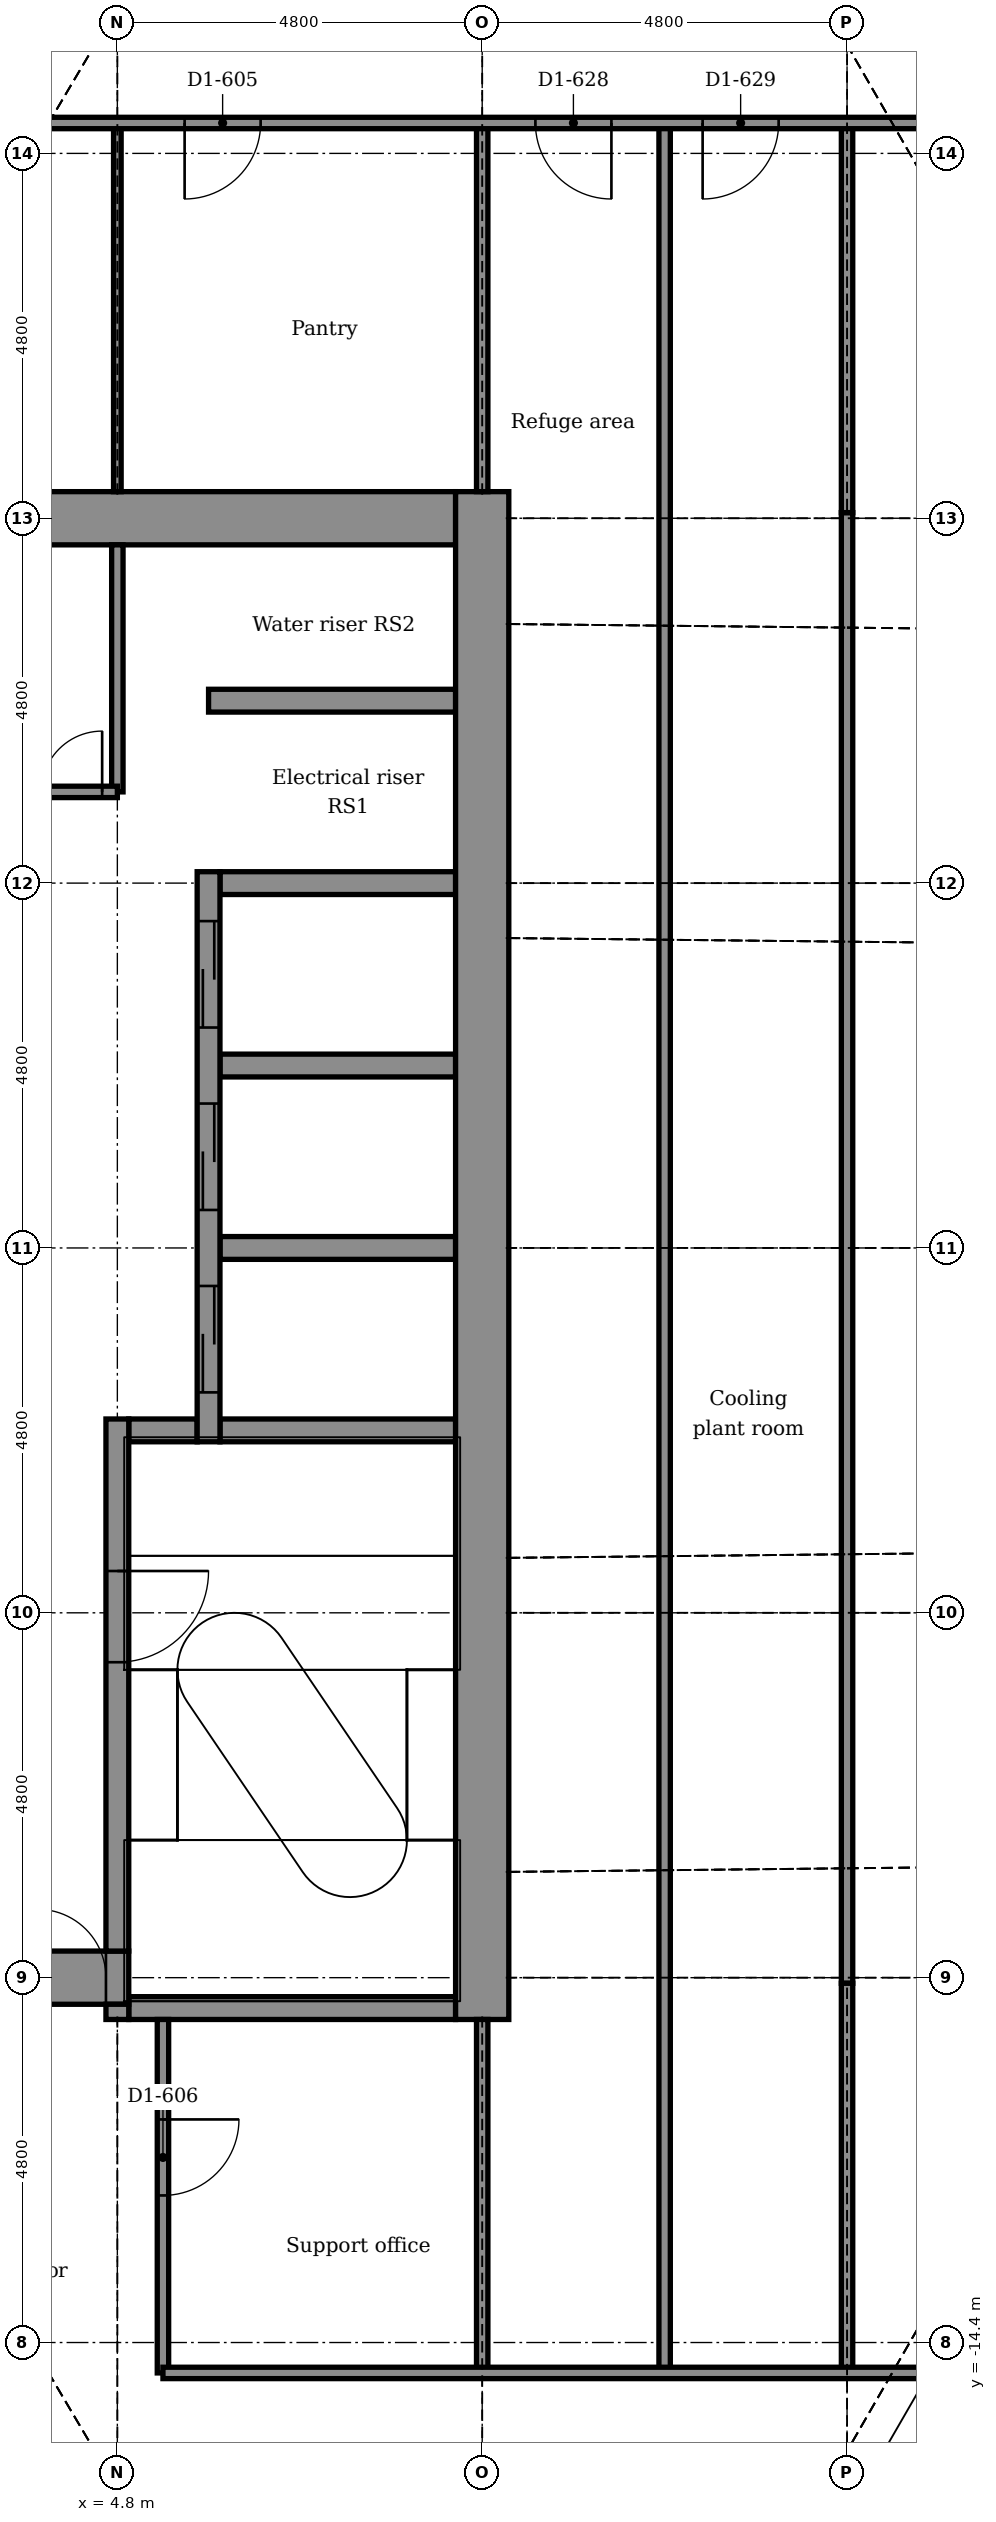
"""IFC4 building model, lengths in metres.
Left out: names, types, materials, properties, quantities, classifications, styles, units other than length and angle.
Written with IfcOpenShell. Run it as: python <this file> out.ifc"""

import sys

from ifc_helpers import new_model, si_unit, direction, frame, frame_2d, origin, place, context, subcontext, project, spatial, rectangle, extrude, element, fill, save


model = new_model("IFC4")
c1 = context("Model", 3, precision=1e-05, world=origin(), true_north=direction((0.0, 1.0)))
c2 = subcontext(c1, "Body", "Model", "MODEL_VIEW")
j1 = project(units=[si_unit("LENGTHUNIT", "METRE"), si_unit("PLANEANGLEUNIT", "RADIAN")], contexts=[c1])
p1 = place(None, origin())
s1 = spatial("IfcSite", under=j1, at=p1, CompositionType="ELEMENT")
p2 = place(p1, origin())
s2 = spatial("IfcBuilding", under=s1, at=p2, CompositionType="ELEMENT")
p3 = place(p2, frame((0.0, 0.0, 216.8)))
s3 = spatial("IfcBuildingStorey", under=s2, at=p3, CompositionType="ELEMENT", Elevation=216.8)
p4 = place(p3, frame((4.95, -10.0, -0.3), z_axis=(0.0, 0.0, 1.0), x_axis=(1.0, 0.0, 0.0)))
e1 = element("IfcWall", 1, at=p4, inside=s3, PredefinedType="STANDARD", context=c2, shape_type="SweptSolid", body=[
    extrude(rectangle(XDim=4.3, YDim=0.3, at=frame_2d((2.15, 0.0))), origin(), (0.0, 0.0, 1.0), 6.15),
])
p5 = place(p3, frame((-5.25, -9.6, -0.3), z_axis=(0.0, 0.0, 1.0), x_axis=(1.0, 0.0, 0.0)))
e2 = element("IfcWall", 2, at=p5, inside=s3, PredefinedType="SHEAR", context=c2, shape_type="SweptSolid", body=[
    extrude(rectangle(XDim=10.2, YDim=0.7, at=frame_2d((5.1, 0.0))), origin(), (0.0, 0.0, 1.0), 6.15),
])
p6 = place(p5, frame((9.0, 0.0, 0.3)))
e3 = element("IfcOpeningElement", 3, at=p6, cuts=e2, PredefinedType="OPENING", context=c2, shape_type="SweptSolid", body=[
    extrude(rectangle(XDim=0.9, YDim=2.1, at=frame_2d((0.45, 1.05))), frame((0.0, 0.36, 0.0), z_axis=(0.0, -1.0, 0.0), x_axis=(1.0, 0.0, 0.0)), (0.0, 0.0, 1.0), 0.72),
])
p7 = place(p3, frame((4.95, -2.4, -0.3), z_axis=(0.0, 0.0, 1.0), x_axis=(1.0, 0.0, 0.0)))
e4 = element("IfcWall", 4, at=p7, inside=s3, PredefinedType="STANDARD", context=c2, shape_type="SweptSolid", body=[
    extrude(rectangle(XDim=0.9, YDim=0.3, at=frame_2d((0.45, 0.0))), origin(), (0.0, 0.0, 1.0), 6.15),
])
for number, where, z_axis, x_axis in (
    (5, (6.15, -2.4, -0.3), (0.0, 0.0, 1.0), (1.0, 0.0, 0.0)),
    (6, (6.15, 0.0, -0.3), (0.0, 0.0, 1.0), (1.0, 0.0, 0.0)),
    (7, (6.15, 2.4, -0.3), (0.0, 0.0, 1.0), (1.0, 0.0, 0.0)),
    (8, (6.15, 4.8, -0.3), (0.0, 0.0, 1.0), (1.0, 0.0, 0.0)),
):
    element("IfcWall", number, at=place(p3, frame(where, z_axis=z_axis, x_axis=x_axis)), inside=s3, PredefinedType="STANDARD", context=c2, shape_type="SweptSolid", body=[
        extrude(rectangle(XDim=3.1, YDim=0.3, at=frame_2d((1.55, 0.0))), origin(), (0.0, 0.0, 1.0), 6.15),
    ])
p8 = place(p3, frame((6.0, 7.2, -0.3), z_axis=(0.0, 0.0, 1.0), x_axis=(1.0, 0.0, 0.0)))
e9 = element("IfcWall", 9, at=p8, inside=s3, PredefinedType="STANDARD", context=c2, shape_type="SweptSolid", body=[
    extrude(rectangle(XDim=3.25, YDim=0.3, at=frame_2d((1.625, 0.0))), origin(), (0.0, 0.0, 1.0), 6.15),
])
p9 = place(p3, frame((-5.25, 9.6, -0.3), z_axis=(0.0, 0.0, 1.0), x_axis=(1.0, 0.0, 0.0)))
e10 = element("IfcWall", 10, at=p9, inside=s3, PredefinedType="SHEAR", context=c2, shape_type="SweptSolid", body=[
    extrude(rectangle(XDim=14.5, YDim=0.7, at=frame_2d((7.25, 0.0))), origin(), (0.0, 0.0, 1.0), 6.15),
])
p10 = place(p9, frame((0.6, 0.0, 0.3)))
e11 = element("IfcOpeningElement", 11, at=p10, cuts=e10, PredefinedType="OPENING", context=c2, shape_type="SweptSolid", body=[
    extrude(rectangle(XDim=0.9, YDim=2.1, at=frame_2d((0.45, 1.05))), frame((0.0, 0.36, 0.0), z_axis=(0.0, -1.0, 0.0), x_axis=(1.0, 0.0, 0.0)), (0.0, 0.0, 1.0), 0.72),
])
p11 = place(p3, frame((4.8, -10.15, -0.3), z_axis=(0.0, 0.0, 1.0), x_axis=(0.0, 1.0, 0.0)))
e12 = element("IfcWall", 12, at=p11, inside=s3, PredefinedType="STANDARD", context=c2, shape_type="SweptSolid", body=[
    extrude(rectangle(XDim=0.2, YDim=0.3, at=frame_2d((0.1, 0.0))), origin(), (0.0, 0.0, 1.0), 6.15),
])
p12 = place(p3, frame((4.8, -9.25, -0.3), z_axis=(0.0, 0.0, 1.0), x_axis=(0.0, 1.0, 0.0)))
e13 = element("IfcWall", 13, at=p12, inside=s3, PredefinedType="STANDARD", context=c2, shape_type="SweptSolid", body=[
    extrude(rectangle(XDim=7.0, YDim=0.3, at=frame_2d((3.5, 0.0))), origin(), (0.0, 0.0, 1.0), 6.15),
])
p13 = place(p12, frame((3.8, 0.0, 0.3)))
e14 = element("IfcOpeningElement", 14, at=p13, cuts=e13, PredefinedType="OPENING", context=c2, shape_type="SweptSolid", body=[
    extrude(rectangle(XDim=1.2, YDim=2.1, at=frame_2d((0.6, 1.05))), frame((0.0, 0.16, 0.0), z_axis=(0.0, -1.0, 0.0), x_axis=(1.0, 0.0, 0.0)), (0.0, 0.0, 1.0), 0.32),
])
p14 = place(p3, frame((6.0, -2.55, -0.3), z_axis=(0.0, 0.0, 1.0), x_axis=(0.0, 1.0, 0.0)))
e15 = element("IfcWall", 15, at=p14, inside=s3, PredefinedType="STANDARD", context=c2, shape_type="SweptSolid", body=[
    extrude(rectangle(XDim=7.5, YDim=0.3, at=frame_2d((3.75, 0.0))), origin(), (0.0, 0.0, 1.0), 6.15),
])
p15 = place(p14, frame((0.65, 0.0, 0.3)))
e16 = element("IfcOpeningElement", 16, at=p15, cuts=e15, PredefinedType="OPENING", context=c2, shape_type="SweptSolid", body=[
    extrude(rectangle(XDim=1.4, YDim=2.1, at=frame_2d((0.7, 1.05))), frame((0.0, 0.16, 0.0), z_axis=(0.0, -1.0, 0.0), x_axis=(1.0, 0.0, 0.0)), (0.0, 0.0, 1.0), 0.32),
])
p16 = place(p14, frame((3.05, 0.0, 0.3)))
e17 = element("IfcOpeningElement", 17, at=p16, cuts=e15, PredefinedType="OPENING", context=c2, shape_type="SweptSolid", body=[
    extrude(rectangle(XDim=1.4, YDim=2.1, at=frame_2d((0.7, 1.05))), frame((0.0, 0.16, 0.0), z_axis=(0.0, -1.0, 0.0), x_axis=(1.0, 0.0, 0.0)), (0.0, 0.0, 1.0), 0.32),
])
p17 = place(p14, frame((5.45, 0.0, 0.3)))
e18 = element("IfcOpeningElement", 18, at=p17, cuts=e15, PredefinedType="OPENING", context=c2, shape_type="SweptSolid", body=[
    extrude(rectangle(XDim=1.4, YDim=2.1, at=frame_2d((0.7, 1.05))), frame((0.0, 0.16, 0.0), z_axis=(0.0, -1.0, 0.0), x_axis=(1.0, 0.0, 0.0)), (0.0, 0.0, 1.0), 0.32),
])
p18 = place(p3, frame((9.6, -10.15, -0.3), z_axis=(0.0, 0.0, 1.0), x_axis=(0.0, 1.0, 0.0)))
e19 = element("IfcWall", 19, at=p18, inside=s3, PredefinedType="SHEAR", context=c2, shape_type="SweptSolid", body=[
    extrude(rectangle(XDim=20.1, YDim=0.7, at=frame_2d((10.05, 0.0))), origin(), (0.0, 0.0, 1.0), 6.15),
])
p19 = place(p3, frame((14.4, -9.674, 0.0), z_axis=(0.0, 0.0, 1.0), x_axis=(0.0, 1.0, 0.0)))
e20 = element("IfcWall", 20, at=p19, inside=s3, PredefinedType="PARTITIONING", context=c2, shape_type="SweptSolid", body=[
    extrude(rectangle(XDim=19.348, YDim=0.15, at=frame_2d((9.674, 0.0))), origin(), (0.0, 0.0, 1.0), 5.85),
])
for number, where, z_axis, x_axis in (
    (21, (14.4, -14.8, 0.0), (0.0, 0.0, 1.0), (0.0, 1.0, 0.0)),
    (22, (14.4, 9.674, 0.0), (0.0, 0.0, 1.0), (0.0, 1.0, 0.0)),
):
    element("IfcWall", number, at=place(p3, frame(where, z_axis=z_axis, x_axis=x_axis)), inside=s3, PredefinedType="PARTITIONING", context=c2, shape_type="SweptSolid", body=[
        extrude(rectangle(XDim=5.126, YDim=0.15, at=frame_2d((2.563, 0.0))), origin(), (0.0, 0.0, 1.0), 5.54),
    ])
p20 = place(p3, frame((12.0, -14.8, 0.0), z_axis=(0.0, 0.0, 1.0), x_axis=(0.0, 1.0, 0.0)))
e23 = element("IfcWall", 23, at=p20, inside=s3, PredefinedType="PARTITIONING", context=c2, shape_type="SweptSolid", body=[
    extrude(rectangle(XDim=29.6, YDim=0.15, at=frame_2d((14.8, 0.0))), origin(), (0.0, 0.0, 1.0), 5.85),
])
p21 = place(p3, frame((9.6, -14.8, 0.0), z_axis=(0.0, 0.0, 1.0), x_axis=(0.0, 1.0, 0.0)))
e24 = element("IfcWall", 24, at=p21, inside=s3, PredefinedType="PARTITIONING", context=c2, shape_type="SweptSolid", body=[
    extrude(rectangle(XDim=4.65, YDim=0.15, at=frame_2d((2.325, 0.0))), origin(), (0.0, 0.0, 1.0), 5.393),
])
p22 = place(p3, frame((9.6, 9.95, 0.0), z_axis=(0.0, 0.0, 1.0), x_axis=(0.0, 1.0, 0.0)))
e25 = element("IfcWall", 25, at=p22, inside=s3, PredefinedType="PARTITIONING", context=c2, shape_type="SweptSolid", body=[
    extrude(rectangle(XDim=4.85, YDim=0.15, at=frame_2d((2.425, 0.0))), origin(), (0.0, 0.0, 1.0), 5.393),
])
p23 = place(p3, frame((5.4, -14.8, 0.0), z_axis=(0.0, 0.0, 1.0), x_axis=(0.0, 1.0, 0.0)))
e26 = element("IfcWall", 26, at=p23, inside=s3, PredefinedType="PARTITIONING", context=c2, shape_type="SweptSolid", body=[
    extrude(rectangle(XDim=4.65, YDim=0.15, at=frame_2d((2.325, 0.0))), origin(), (0.0, 0.0, 1.0), 5.85),
])
p24 = place(p23, frame((2.335, 0.0, 0.0)))
e27 = element("IfcOpeningElement", 27, at=p24, cuts=e26, PredefinedType="OPENING", context=c2, shape_type="SweptSolid", body=[
    extrude(rectangle(XDim=1.0, YDim=2.1, at=frame_2d((0.5, 1.05))), frame((0.0, 0.085, 0.0), z_axis=(0.0, -1.0, 0.0), x_axis=(1.0, 0.0, 0.0)), (0.0, 0.0, 1.0), 0.17),
])
p25 = place(p3, frame((4.8, 9.95, 0.0), z_axis=(0.0, 0.0, 1.0), x_axis=(0.0, 1.0, 0.0)))
e28 = element("IfcWall", 28, at=p25, inside=s3, PredefinedType="PARTITIONING", context=c2, shape_type="SweptSolid", body=[
    extrude(rectangle(XDim=4.85, YDim=0.1, at=frame_2d((2.425, 0.0))), origin(), (0.0, 0.0, 1.0), 5.54),
])
p26 = place(p3, frame((4.8, 6.0, 0.0), z_axis=(0.0, 0.0, 1.0), x_axis=(0.0, 1.0, 0.0)))
e29 = element("IfcWall", 29, at=p26, inside=s3, PredefinedType="PARTITIONING", context=c2, shape_type="SweptSolid", body=[
    extrude(rectangle(XDim=3.25, YDim=0.15, at=frame_2d((1.625, 0.0))), origin(), (0.0, 0.0, 1.0), 5.85),
])
p27 = place(p3, frame((5.4, -14.8, 0.0), z_axis=(0.0, 0.0, 1.0), x_axis=(1.0, 0.0, 0.0)))
e30 = element("IfcWall", 30, at=p27, inside=s3, PredefinedType="PARTITIONING", context=c2, shape_type="SweptSolid", body=[
    extrude(rectangle(XDim=11.834, YDim=0.15, at=frame_2d((5.917, 0.0))), origin(), (0.0, 0.0, 1.0), 5.7),
])
p28 = place(p27, frame((10.511, 0.0, 0.0)))
e31 = element("IfcOpeningElement", 31, at=p28, cuts=e30, PredefinedType="OPENING", context=c2, shape_type="SweptSolid", body=[
    extrude(rectangle(XDim=1.0, YDim=2.1, at=frame_2d((0.5, 1.05))), frame((0.0, 0.085, 0.0), z_axis=(0.0, -1.0, 0.0), x_axis=(1.0, 0.0, 0.0)), (0.0, 0.0, 1.0), 0.17),
])
p29 = place(p3, frame((3.75, 6.0, 0.0), z_axis=(0.0, 0.0, 1.0), x_axis=(1.0, 0.0, 0.0)))
e32 = element("IfcWall", 32, at=p29, inside=s3, PredefinedType="PARTITIONING", context=c2, shape_type="SweptSolid", body=[
    extrude(rectangle(XDim=1.05, YDim=0.15, at=frame_2d((0.525, 0.0))), origin(), (0.0, 0.0, 1.0), 5.85),
])
p30 = place(p29, frame((0.05, 0.0, 0.0)))
e33 = element("IfcOpeningElement", 33, at=p30, cuts=e32, PredefinedType="OPENING", context=c2, shape_type="SweptSolid", body=[
    extrude(rectangle(XDim=0.8, YDim=2.1, at=frame_2d((0.4, 1.05))), frame((0.0, 0.085, 0.0), z_axis=(0.0, -1.0, 0.0), x_axis=(1.0, 0.0, 0.0)), (0.0, 0.0, 1.0), 0.17),
])
p31 = place(p3, frame((-3.0, 14.8, 0.0), z_axis=(0.0, 0.0, 1.0), x_axis=(1.0, 0.0, 0.0)))
e34 = element("IfcWall", 34, at=p31, inside=s3, PredefinedType="PARTITIONING", context=c2, shape_type="SweptSolid", body=[
    extrude(rectangle(XDim=21.385, YDim=0.15, at=frame_2d((10.692, 0.0))), origin(), (0.0, 0.0, 1.0), 5.85),
])
p32 = place(p31, frame((1.05, 0.0, 0.0)))
e35 = element("IfcOpeningElement", 35, at=p32, cuts=e34, PredefinedType="OPENING", context=c2, shape_type="SweptSolid", body=[
    extrude(rectangle(XDim=0.9, YDim=2.1, at=frame_2d((0.45, 1.05))), frame((0.0, 0.085, 0.0), z_axis=(0.0, -1.0, 0.0), x_axis=(1.0, 0.0, 0.0)), (0.0, 0.0, 1.0), 0.17),
])
p33 = place(p31, frame((4.95, 0.0, 0.0)))
e36 = element("IfcOpeningElement", 36, at=p33, cuts=e34, PredefinedType="OPENING", context=c2, shape_type="SweptSolid", body=[
    extrude(rectangle(XDim=0.9, YDim=2.1, at=frame_2d((0.45, 1.05))), frame((0.0, 0.085, 0.0), z_axis=(0.0, -1.0, 0.0), x_axis=(1.0, 0.0, 0.0)), (0.0, 0.0, 1.0), 0.17),
])
p34 = place(p31, frame((8.685, 0.0, 0.0)))
e37 = element("IfcOpeningElement", 37, at=p34, cuts=e34, PredefinedType="OPENING", context=c2, shape_type="SweptSolid", body=[
    extrude(rectangle(XDim=1.0, YDim=2.1, at=frame_2d((0.5, 1.05))), frame((0.0, 0.085, 0.0), z_axis=(0.0, -1.0, 0.0), x_axis=(1.0, 0.0, 0.0)), (0.0, 0.0, 1.0), 0.17),
])
p35 = place(p31, frame((13.3, 0.0, 0.0)))
e38 = element("IfcOpeningElement", 38, at=p35, cuts=e34, PredefinedType="OPENING", context=c2, shape_type="SweptSolid", body=[
    extrude(rectangle(XDim=1.0, YDim=2.1, at=frame_2d((0.5, 1.05))), frame((0.0, 0.085, 0.0), z_axis=(0.0, -1.0, 0.0), x_axis=(1.0, 0.0, 0.0)), (0.0, 0.0, 1.0), 0.17),
])
p36 = place(p31, frame((15.5, 0.0, 0.0)))
e39 = element("IfcOpeningElement", 39, at=p36, cuts=e34, PredefinedType="OPENING", context=c2, shape_type="SweptSolid", body=[
    extrude(rectangle(XDim=1.0, YDim=2.1, at=frame_2d((0.5, 1.05))), frame((0.0, 0.085, 0.0), z_axis=(0.0, -1.0, 0.0), x_axis=(1.0, 0.0, 0.0)), (0.0, 0.0, 1.0), 0.17),
])
p37 = place(p30, origin())
e40 = element("IfcDoor", 40, at=p37, inside=s3, OperationType="SINGLE_SWING_RIGHT", PredefinedType="DOOR", context=c2, shape_type="SweptSolid", body=[
    extrude(rectangle(XDim=0.8, YDim=2.1, at=frame_2d((0.4, 1.05))), frame((0.0, 0.025, 0.0), z_axis=(0.0, -1.0, 0.0), x_axis=(1.0, 0.0, 0.0)), (0.0, 0.0, 1.0), 0.05),
])
fill(e33, e40)
p38 = place(p34, frame((1.0, 0.0, 0.0), z_axis=(0.0, 0.0, 1.0), x_axis=(-1.0, 0.0, 0.0)))
e41 = element("IfcDoor", 41, at=p38, inside=s3, OperationType="SINGLE_SWING_LEFT", PredefinedType="DOOR", context=c2, shape_type="SweptSolid", body=[
    extrude(rectangle(XDim=1.0, YDim=2.1, at=frame_2d((0.5, 1.05))), frame((0.0, 0.025, 0.0), z_axis=(0.0, -1.0, 0.0), x_axis=(1.0, 0.0, 0.0)), (0.0, 0.0, 1.0), 0.05),
])
fill(e37, e41)
p39 = place(p24, frame((1.0, 0.0, 0.0), z_axis=(0.0, 0.0, 1.0), x_axis=(-1.0, 0.0, 0.0)))
e42 = element("IfcDoor", 42, at=p39, inside=s3, OperationType="SINGLE_SWING_RIGHT", PredefinedType="DOOR", context=c2, shape_type="SweptSolid", body=[
    extrude(rectangle(XDim=1.0, YDim=2.1, at=frame_2d((0.5, 1.05))), frame((0.0, 0.025, 0.0), z_axis=(0.0, -1.0, 0.0), x_axis=(1.0, 0.0, 0.0)), (0.0, 0.0, 1.0), 0.05),
])
fill(e27, e42)
p40 = place(p35, frame((1.0, 0.0, 0.0), z_axis=(0.0, 0.0, 1.0), x_axis=(-1.0, 0.0, 0.0)))
e43 = element("IfcDoor", 43, at=p40, inside=s3, OperationType="SINGLE_SWING_RIGHT", PredefinedType="DOOR", context=c2, shape_type="SweptSolid", body=[
    extrude(rectangle(XDim=1.0, YDim=2.1, at=frame_2d((0.5, 1.05))), frame((0.0, 0.025, 0.0), z_axis=(0.0, -1.0, 0.0), x_axis=(1.0, 0.0, 0.0)), (0.0, 0.0, 1.0), 0.05),
])
fill(e38, e43)
p41 = place(p36, frame((1.0, 0.0, 0.0), z_axis=(0.0, 0.0, 1.0), x_axis=(-1.0, 0.0, 0.0)))
e44 = element("IfcDoor", 44, at=p41, inside=s3, OperationType="SINGLE_SWING_LEFT", PredefinedType="DOOR", context=c2, shape_type="SweptSolid", body=[
    extrude(rectangle(XDim=1.0, YDim=2.1, at=frame_2d((0.5, 1.05))), frame((0.0, 0.025, 0.0), z_axis=(0.0, -1.0, 0.0), x_axis=(1.0, 0.0, 0.0)), (0.0, 0.0, 1.0), 0.05),
])
fill(e39, e44)
p42 = place(p15, origin())
e45 = element("IfcDoor", 45, at=p42, inside=s3, OperationType="DOUBLE_DOOR_SLIDING", PredefinedType="DOOR", context=c2, shape_type="SweptSolid", body=[
    extrude(rectangle(XDim=1.4, YDim=2.1, at=frame_2d((0.7, 1.05))), frame((0.0, 0.025, 0.0), z_axis=(0.0, -1.0, 0.0), x_axis=(1.0, 0.0, 0.0)), (0.0, 0.0, 1.0), 0.05),
])
fill(e16, e45)
p43 = place(p16, origin())
e46 = element("IfcDoor", 46, at=p43, inside=s3, OperationType="DOUBLE_DOOR_SLIDING", PredefinedType="DOOR", context=c2, shape_type="SweptSolid", body=[
    extrude(rectangle(XDim=1.4, YDim=2.1, at=frame_2d((0.7, 1.05))), frame((0.0, 0.025, 0.0), z_axis=(0.0, -1.0, 0.0), x_axis=(1.0, 0.0, 0.0)), (0.0, 0.0, 1.0), 0.05),
])
fill(e17, e46)
p44 = place(p17, origin())
e47 = element("IfcDoor", 47, at=p44, inside=s3, OperationType="DOUBLE_DOOR_SLIDING", PredefinedType="DOOR", context=c2, shape_type="SweptSolid", body=[
    extrude(rectangle(XDim=1.4, YDim=2.1, at=frame_2d((0.7, 1.05))), frame((0.0, 0.025, 0.0), z_axis=(0.0, -1.0, 0.0), x_axis=(1.0, 0.0, 0.0)), (0.0, 0.0, 1.0), 0.05),
])
fill(e18, e47)
p45 = place(p13, frame((1.2, 0.0, 0.0), z_axis=(0.0, 0.0, 1.0), x_axis=(-1.0, 0.0, 0.0)))
e48 = element("IfcDoor", 48, at=p45, inside=s3, OperationType="SINGLE_SWING_RIGHT", PredefinedType="DOOR", context=c2, shape_type="SweptSolid", body=[
    extrude(rectangle(XDim=1.2, YDim=2.1, at=frame_2d((0.6, 1.05))), frame((0.0, 0.025, 0.0), z_axis=(0.0, -1.0, 0.0), x_axis=(1.0, 0.0, 0.0)), (0.0, 0.0, 1.0), 0.05),
])
fill(e14, e48)
p46 = place(p6, origin())
e49 = element("IfcDoor", 49, at=p46, inside=s3, OperationType="SINGLE_SWING_LEFT", PredefinedType="DOOR", context=c2, shape_type="SweptSolid", body=[
    extrude(rectangle(XDim=0.9, YDim=2.1, at=frame_2d((0.45, 1.05))), frame((0.0, 0.025, 0.0), z_axis=(0.0, -1.0, 0.0), x_axis=(1.0, 0.0, 0.0)), (0.0, 0.0, 1.0), 0.05),
])
fill(e3, e49)
save(model, sys.argv[1])
